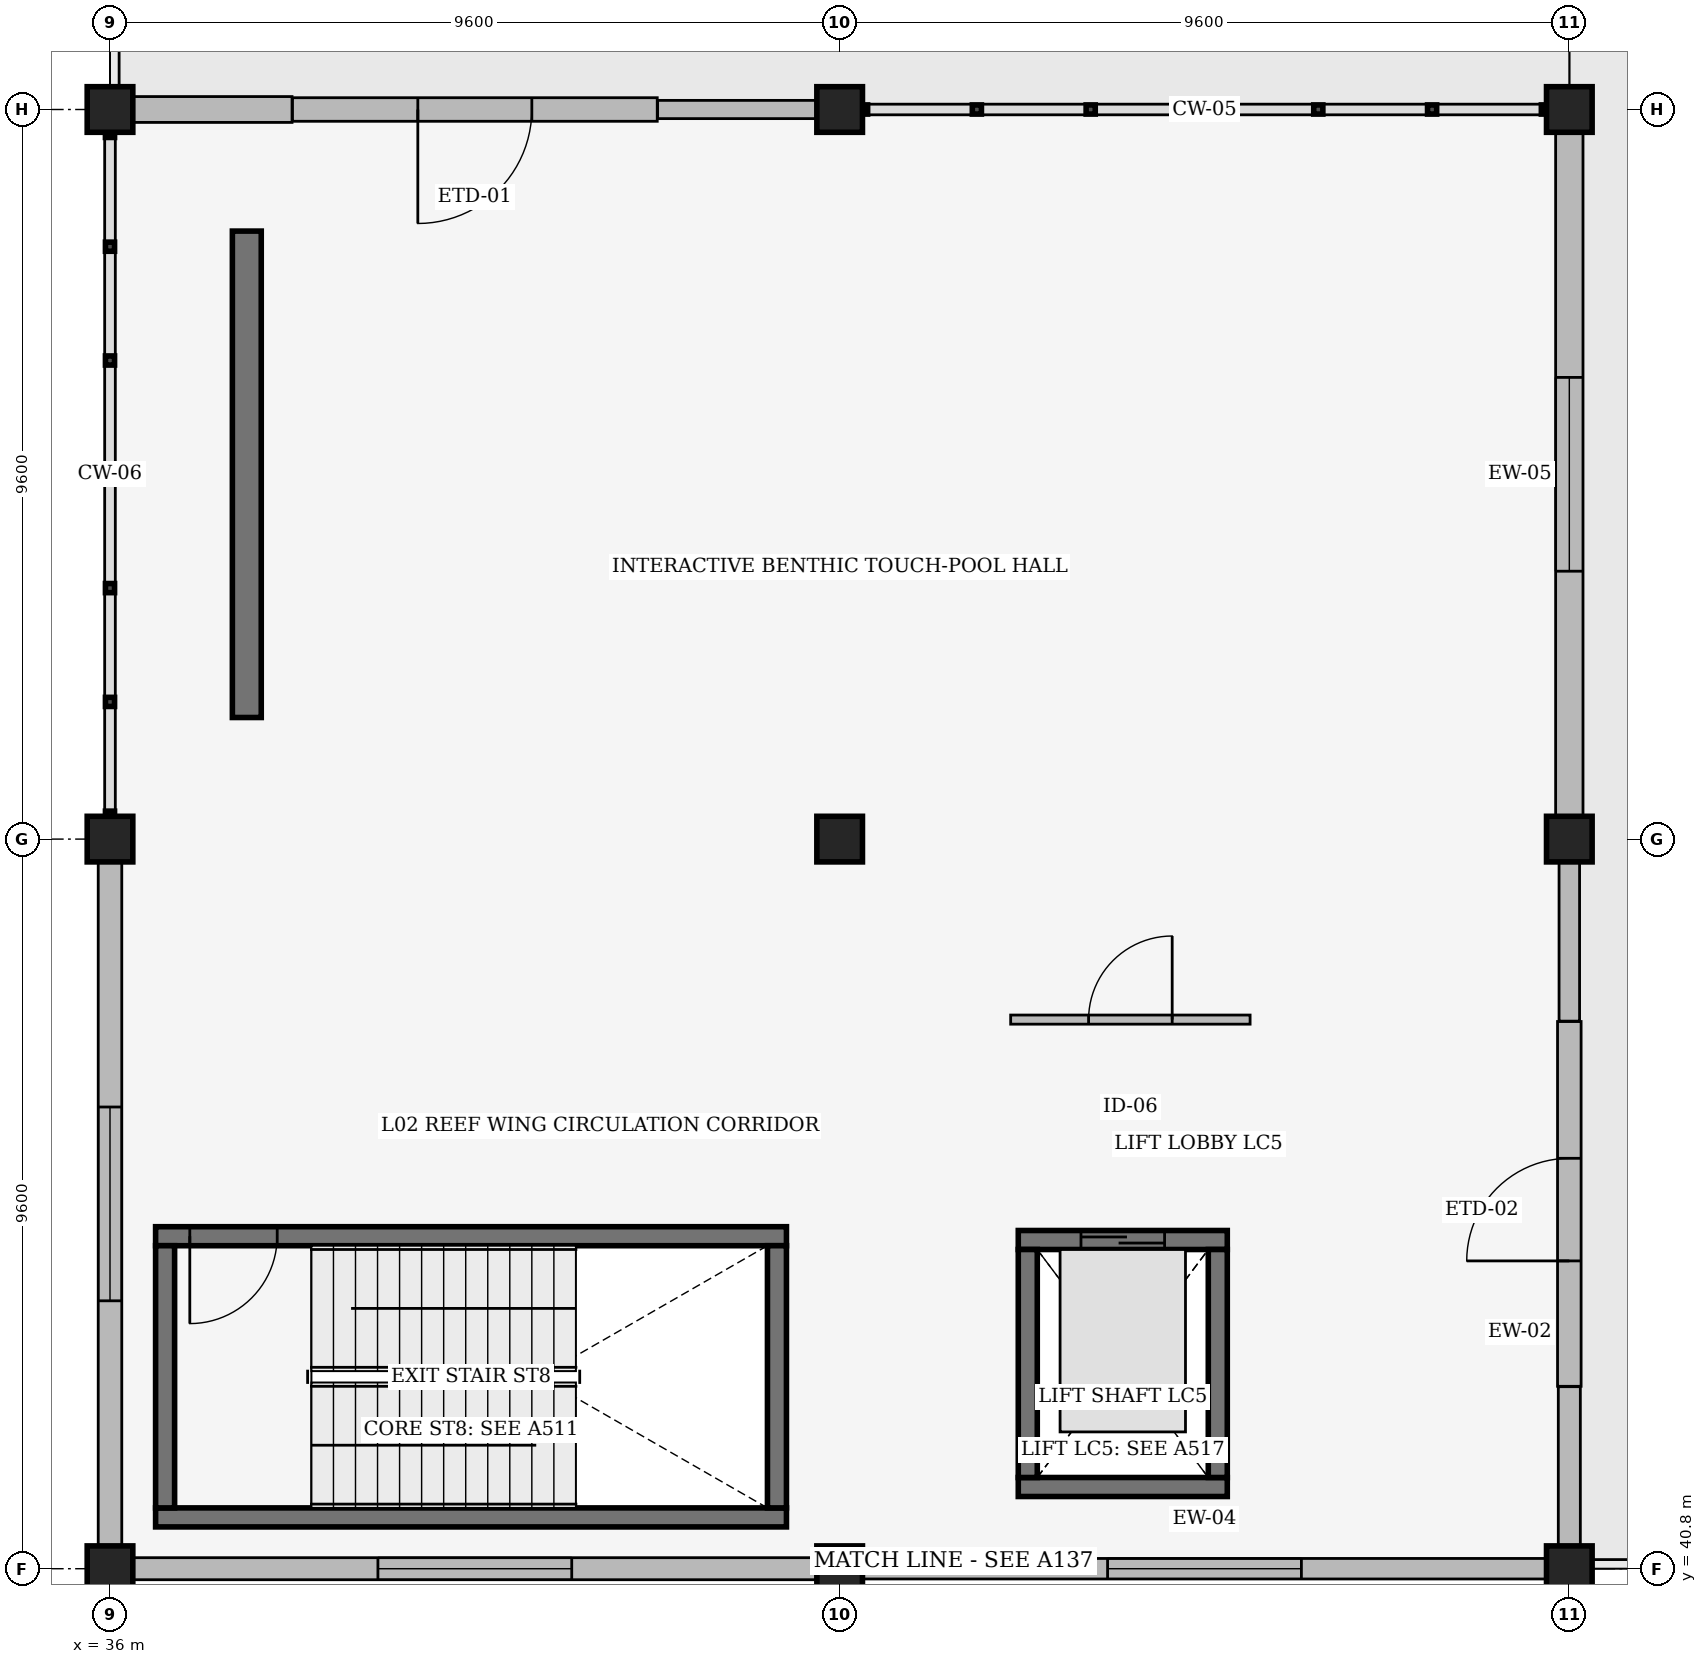
"""IFC4 building model, lengths in metres.
Left out: names, types, materials, properties, quantities, classifications, styles, units other than length and angle.
Written with IfcOpenShell. Run it as: python <this file> out.ifc"""

import sys

from ifc_helpers import new_model, si_unit, direction, frame, frame_2d, origin, origin_2d, place, context, subcontext, project, spatial, rectangle, extrude, element, fill, save


model = new_model("IFC4")
c1 = context("Model", 3, precision=1e-05, world=origin(), true_north=direction((0.0, 1.0)))
c2 = subcontext(c1, "Body", "Model", "MODEL_VIEW")
j1 = project(units=[si_unit("LENGTHUNIT", "METRE"), si_unit("PLANEANGLEUNIT", "RADIAN")], contexts=[c1])
p1 = place(None, origin())
s1 = spatial("IfcSite", under=j1, at=p1, CompositionType="ELEMENT")
p2 = place(p1, origin())
s2 = spatial("IfcBuilding", under=s1, at=p2, CompositionType="ELEMENT")
p3 = place(p2, frame((0.0, 0.0, 10.5)))
s3 = spatial("IfcBuildingStorey", under=s2, at=p3, CompositionType="ELEMENT", Elevation=10.5)
for number, where, z_axis, x_axis in (
    (1, (36.0, 40.8, 0.0), (0.0, 0.0, 1.0), (1.0, 0.0, 0.0)),
    (2, (36.0, 50.4, 0.0), (0.0, 0.0, 1.0), (1.0, 0.0, 0.0)),
    (3, (36.0, 60.0, 0.0), (0.0, 0.0, 1.0), (1.0, 0.0, 0.0)),
    (4, (45.6, 40.8, 0.0), (0.0, 0.0, 1.0), (1.0, 0.0, 0.0)),
    (5, (45.6, 50.4, 0.0), (0.0, 0.0, 1.0), (1.0, 0.0, 0.0)),
    (6, (45.6, 60.0, 0.0), (0.0, 0.0, 1.0), (1.0, 0.0, 0.0)),
    (7, (55.2, 40.8, 0.0), (0.0, 0.0, 1.0), (1.0, 0.0, 0.0)),
    (8, (55.2, 50.4, 0.0), (0.0, 0.0, 1.0), (1.0, 0.0, 0.0)),
    (9, (55.2, 60.0, 0.0), (0.0, 0.0, 1.0), (1.0, 0.0, 0.0)),
):
    element("IfcColumn", number, at=place(p3, frame(where, z_axis=z_axis, x_axis=x_axis)), inside=s3, PredefinedType="COLUMN", context=c2, shape_type="SweptSolid", body=[
        extrude(rectangle(XDim=0.6, YDim=0.6, at=origin_2d()), origin(), (0.0, 0.0, 1.0), 4.8),
    ])
p4 = place(p3, frame((37.8, 52.0, 0.0), z_axis=(0.0, 0.0, 1.0), x_axis=(0.0, 1.0, 0.0)))
e10 = element("IfcWall", 10, at=p4, inside=s3, PredefinedType="SHEAR", context=c2, shape_type="SweptSolid", body=[
    extrude(rectangle(XDim=6.4, YDim=0.38, at=frame_2d((3.2, 0.0))), origin(), (0.0, 0.0, 1.0), 4.8),
])
p5 = place(p3, frame((55.2, 43.2, 0.0), z_axis=(0.0, 0.0, 1.0), x_axis=(0.0, 1.0, 0.0)))
e11 = element("IfcWall", 11, at=p5, inside=s3, PredefinedType="SOLIDWALL", context=c2, shape_type="SweptSolid", body=[
    extrude(rectangle(XDim=4.8, YDim=0.31, at=frame_2d((2.4, 0.0))), origin(), (0.0, 0.0, 1.0), 4.069),
])
p6 = place(p5, frame((3.0, 0.0, 0.0), z_axis=(0.0, 0.0, 1.0), x_axis=(-1.0, 0.0, 0.0)))
e12 = element("IfcOpeningElement", 12, at=p6, cuts=e11, PredefinedType="OPENING", context=c2, shape_type="SweptSolid", body=[
    extrude(rectangle(XDim=1.35, YDim=2.2, at=frame_2d((0.675, 1.1))), frame((0.0, 0.165, 0.0), z_axis=(0.0, -1.0, 0.0), x_axis=(1.0, 0.0, 0.0)), (0.0, 0.0, 1.0), 0.33),
])
p7 = place(p3, frame((43.2, 60.0, 0.0), z_axis=(0.0, 0.0, 1.0), x_axis=(-1.0, 0.0, 0.0)))
e13 = element("IfcWall", 13, at=p7, inside=s3, PredefinedType="SOLIDWALL", context=c2, shape_type="SweptSolid", body=[
    extrude(rectangle(XDim=4.8, YDim=0.31, at=frame_2d((2.4, 0.0))), origin(), (0.0, 0.0, 1.0), 4.138),
])
p8 = place(p7, frame((3.15, 0.0, 0.0), z_axis=(0.0, 0.0, 1.0), x_axis=(-1.0, 0.0, 0.0)))
e14 = element("IfcOpeningElement", 14, at=p8, cuts=e13, PredefinedType="OPENING", context=c2, shape_type="SweptSolid", body=[
    extrude(rectangle(XDim=1.5, YDim=2.25, at=frame_2d((0.75, 1.125))), frame((0.0, 0.165, 0.0), z_axis=(0.0, -1.0, 0.0), x_axis=(1.0, 0.0, 0.0)), (0.0, 0.0, 1.0), 0.33),
])
p9 = place(p3, frame((55.2, 41.108, 0.0), z_axis=(0.0, 0.0, 1.0), x_axis=(0.0, 1.0, 0.0)))
e15 = element("IfcWall", 15, at=p9, inside=s3, PredefinedType="SOLIDWALL", context=c2, shape_type="SweptSolid", body=[
    extrude(rectangle(XDim=2.087, YDim=0.29, at=frame_2d((1.043, 0.0))), origin(), (0.0, 0.0, 1.0), 4.178),
])
p10 = place(p3, frame((55.2, 48.005, 0.0), z_axis=(0.0, 0.0, 1.0), x_axis=(0.0, 1.0, 0.0)))
e16 = element("IfcWall", 16, at=p10, inside=s3, PredefinedType="SOLIDWALL", context=c2, shape_type="SweptSolid", body=[
    extrude(rectangle(XDim=2.087, YDim=0.27, at=frame_2d((1.043, 0.0))), origin(), (0.0, 0.0, 1.0), 4.069),
])
p11 = place(p3, frame((55.2, 50.708, 0.0), z_axis=(0.0, 0.0, 1.0), x_axis=(0.0, 1.0, 0.0)))
e17 = element("IfcWall", 17, at=p11, inside=s3, PredefinedType="SOLIDWALL", context=c2, shape_type="SweptSolid", body=[
    extrude(rectangle(XDim=8.984, YDim=0.36, at=frame_2d((4.492, 0.0))), origin(), (0.0, 0.0, 1.0), 4.029),
])
p12 = place(p11, frame((3.217, 0.0, 0.95)))
e18 = element("IfcOpeningElement", 18, at=p12, cuts=e17, PredefinedType="OPENING", context=c2, shape_type="SweptSolid", body=[
    extrude(rectangle(XDim=2.55, YDim=1.2, at=frame_2d((1.275, 0.6))), frame((0.0, 0.19, 0.0), z_axis=(0.0, -1.0, 0.0), x_axis=(1.0, 0.0, 0.0)), (0.0, 0.0, 1.0), 0.38),
])
p13 = place(p3, frame((45.292, 60.0, 0.0), z_axis=(0.0, 0.0, 1.0), x_axis=(-1.0, 0.0, 0.0)))
e19 = element("IfcWall", 19, at=p13, inside=s3, PredefinedType="SOLIDWALL", context=c2, shape_type="SweptSolid", body=[
    extrude(rectangle(XDim=2.087, YDim=0.24, at=frame_2d((1.043, 0.0))), origin(), (0.0, 0.0, 1.0), 4.138),
])
p14 = place(p3, frame((38.395, 60.0, 0.0), z_axis=(0.0, 0.0, 1.0), x_axis=(-1.0, 0.0, 0.0)))
e20 = element("IfcWall", 20, at=p14, inside=s3, PredefinedType="SOLIDWALL", context=c2, shape_type="SweptSolid", body=[
    extrude(rectangle(XDim=2.087, YDim=0.34, at=frame_2d((1.043, 0.0))), origin(), (0.0, 0.0, 1.0), 4.138),
])
p15 = place(p3, frame((36.0, 50.092, 0.0), z_axis=(0.0, 0.0, 1.0), x_axis=(0.0, -1.0, 0.0)))
e21 = element("IfcWall", 21, at=p15, inside=s3, PredefinedType="SOLIDWALL", context=c2, shape_type="SweptSolid", body=[
    extrude(rectangle(XDim=8.984, YDim=0.31, at=frame_2d((4.492, 0.0))), origin(), (0.0, 0.0, 1.0), 4.133),
])
p16 = place(p15, frame((3.217, 0.0, 0.95)))
e22 = element("IfcOpeningElement", 22, at=p16, cuts=e21, PredefinedType="OPENING", context=c2, shape_type="SweptSolid", body=[
    extrude(rectangle(XDim=2.55, YDim=1.5, at=frame_2d((1.275, 0.75))), frame((0.0, 0.165, 0.0), z_axis=(0.0, -1.0, 0.0), x_axis=(1.0, 0.0, 0.0)), (0.0, 0.0, 1.0), 0.33),
])
p17 = place(p3, frame((36.308, 40.8, 0.0), z_axis=(0.0, 0.0, 1.0), x_axis=(1.0, 0.0, 0.0)))
e23 = element("IfcWall", 23, at=p17, inside=s3, PredefinedType="SOLIDWALL", context=c2, shape_type="SweptSolid", body=[
    extrude(rectangle(XDim=8.984, YDim=0.29, at=frame_2d((4.492, 0.0))), origin(), (0.0, 0.0, 1.0), 3.875),
])
p18 = place(p17, frame((3.217, 0.0, 0.95)))
e24 = element("IfcOpeningElement", 24, at=p18, cuts=e23, PredefinedType="OPENING", context=c2, shape_type="SweptSolid", body=[
    extrude(rectangle(XDim=2.55, YDim=1.8, at=frame_2d((1.275, 0.9))), frame((0.0, 0.155, 0.0), z_axis=(0.0, -1.0, 0.0), x_axis=(1.0, 0.0, 0.0)), (0.0, 0.0, 1.0), 0.31),
])
p19 = place(p3, frame((45.908, 40.8, 0.0), z_axis=(0.0, 0.0, 1.0), x_axis=(1.0, 0.0, 0.0)))
e25 = element("IfcWall", 25, at=p19, inside=s3, PredefinedType="SOLIDWALL", context=c2, shape_type="SweptSolid", body=[
    extrude(rectangle(XDim=8.984, YDim=0.27, at=frame_2d((4.492, 0.0))), origin(), (0.0, 0.0, 1.0), 3.875),
])
p20 = place(p19, frame((3.217, 0.0, 0.95)))
e26 = element("IfcOpeningElement", 26, at=p20, cuts=e25, PredefinedType="OPENING", context=c2, shape_type="SweptSolid", body=[
    extrude(rectangle(XDim=2.55, YDim=2.1, at=frame_2d((1.275, 1.05))), frame((0.0, 0.145, 0.0), z_axis=(0.0, -1.0, 0.0), x_axis=(1.0, 0.0, 0.0)), (0.0, 0.0, 1.0), 0.29),
])
p21 = place(p3, frame((36.6, 41.475, 0.0), z_axis=(0.0, 0.0, 1.0), x_axis=(1.0, 0.0, 0.0)))
e27 = element("IfcWall", 27, at=p21, inside=s3, PredefinedType="SHEAR", context=c2, shape_type="SweptSolid", body=[
    extrude(rectangle(XDim=8.3, YDim=0.25, at=frame_2d((4.15, 0.0))), origin(), (0.0, 0.0, 1.0), 4.52),
])
p22 = place(p3, frame((44.9, 45.175, 0.0), z_axis=(0.0, 0.0, 1.0), x_axis=(-1.0, 0.0, 0.0)))
e28 = element("IfcWall", 28, at=p22, inside=s3, PredefinedType="SHEAR", context=c2, shape_type="SweptSolid", body=[
    extrude(rectangle(XDim=8.3, YDim=0.25, at=frame_2d((4.15, 0.0))), origin(), (0.0, 0.0, 1.0), 4.52),
])
p23 = place(p22, frame((7.85, 0.0, 0.0), z_axis=(0.0, 0.0, 1.0), x_axis=(-1.0, 0.0, 0.0)))
e29 = element("IfcOpeningElement", 29, at=p23, cuts=e28, PredefinedType="OPENING", context=c2, shape_type="SweptSolid", body=[
    extrude(rectangle(XDim=1.15, YDim=2.2, at=frame_2d((0.575, 1.1))), frame((0.0, 0.135, 0.0), z_axis=(0.0, -1.0, 0.0), x_axis=(1.0, 0.0, 0.0)), (0.0, 0.0, 1.0), 0.27),
])
for number, where, z_axis, x_axis in (
    (30, (36.725, 45.05, 0.0), (0.0, 0.0, 1.0), (0.0, -1.0, 0.0)),
    (31, (44.775, 41.6, 0.0), (0.0, 0.0, 1.0), (0.0, 1.0, 0.0)),
):
    element("IfcWall", number, at=place(p3, frame(where, z_axis=z_axis, x_axis=x_axis)), inside=s3, PredefinedType="SHEAR", context=c2, shape_type="SweptSolid", body=[
        extrude(rectangle(XDim=3.45, YDim=0.25, at=frame_2d((1.725, 0.0))), origin(), (0.0, 0.0, 1.0), 4.52),
    ])
p24 = place(p3, frame((47.95, 41.875, 0.0), z_axis=(0.0, 0.0, 1.0), x_axis=(1.0, 0.0, 0.0)))
e32 = element("IfcWall", 32, at=p24, inside=s3, PredefinedType="SHEAR", context=c2, shape_type="SweptSolid", body=[
    extrude(rectangle(XDim=2.75, YDim=0.25, at=frame_2d((1.375, 0.0))), origin(), (0.0, 0.0, 1.0), 4.52),
])
p25 = place(p3, frame((47.95, 45.125, 0.0), z_axis=(0.0, 0.0, 1.0), x_axis=(1.0, 0.0, 0.0)))
e33 = element("IfcWall", 33, at=p25, inside=s3, PredefinedType="SHEAR", context=c2, shape_type="SweptSolid", body=[
    extrude(rectangle(XDim=2.75, YDim=0.25, at=frame_2d((1.375, 0.0))), origin(), (0.0, 0.0, 1.0), 4.52),
])
p26 = place(p25, frame((0.825, 0.0, 0.0)))
e34 = element("IfcOpeningElement", 34, at=p26, cuts=e33, PredefinedType="OPENING", context=c2, shape_type="SweptSolid", body=[
    extrude(rectangle(XDim=1.1, YDim=2.2, at=frame_2d((0.55, 1.1))), frame((0.0, 0.135, 0.0), z_axis=(0.0, -1.0, 0.0), x_axis=(1.0, 0.0, 0.0)), (0.0, 0.0, 1.0), 0.27),
])
for number, where, z_axis, x_axis in (
    (35, (48.075, 42.0, 0.0), (0.0, 0.0, 1.0), (0.0, 1.0, 0.0)),
    (36, (50.575, 42.0, 0.0), (0.0, 0.0, 1.0), (0.0, 1.0, 0.0)),
):
    element("IfcWall", number, at=place(p3, frame(where, z_axis=z_axis, x_axis=x_axis)), inside=s3, PredefinedType="SHEAR", context=c2, shape_type="SweptSolid", body=[
        extrude(rectangle(XDim=3.0, YDim=0.25, at=frame_2d((1.5, 0.0))), origin(), (0.0, 0.0, 1.0), 4.52),
    ])
p27 = place(p3, frame((47.85, 48.025, 0.0), z_axis=(0.0, 0.0, 1.0), x_axis=(1.0, 0.0, 0.0)))
e37 = element("IfcWall", 37, at=p27, inside=s3, PredefinedType="PARTITIONING", context=c2, shape_type="SweptSolid", body=[
    extrude(rectangle(XDim=3.15, YDim=0.12, at=frame_2d((1.575, 0.0))), origin(), (0.0, 0.0, 1.0), 4.069),
])
p28 = place(p27, frame((1.025, 0.0, 0.0)))
e38 = element("IfcOpeningElement", 38, at=p28, cuts=e37, PredefinedType="OPENING", context=c2, shape_type="SweptSolid", body=[
    extrude(rectangle(XDim=1.1, YDim=2.2, at=frame_2d((0.55, 1.1))), frame((0.0, 0.07, 0.0), z_axis=(0.0, -1.0, 0.0), x_axis=(1.0, 0.0, 0.0)), (0.0, 0.0, 1.0), 0.14),
])
p29 = place(p6, origin())
e39 = element("IfcDoor", 39, at=p29, inside=s3, OperationType="SINGLE_SWING_RIGHT", PredefinedType="DOOR", context=c2, shape_type="SweptSolid", body=[
    extrude(rectangle(XDim=1.35, YDim=2.2, at=frame_2d((0.675, 1.1))), frame((0.0, 0.025, 0.0), z_axis=(0.0, -1.0, 0.0), x_axis=(1.0, 0.0, 0.0)), (0.0, 0.0, 1.0), 0.05),
])
fill(e12, e39)
p30 = place(p8, origin())
e40 = element("IfcDoor", 40, at=p30, inside=s3, OperationType="SINGLE_SWING_LEFT", PredefinedType="DOOR", context=c2, shape_type="SweptSolid", body=[
    extrude(rectangle(XDim=1.5, YDim=2.25, at=frame_2d((0.75, 1.125))), frame((0.0, 0.025, 0.0), z_axis=(0.0, -1.0, 0.0), x_axis=(1.0, 0.0, 0.0)), (0.0, 0.0, 1.0), 0.05),
])
fill(e14, e40)
p31 = place(p12, origin())
e41 = element("IfcWindow", 41, at=p31, inside=s3, PartitioningType="SINGLE_PANEL", PredefinedType="WINDOW", context=c2, shape_type="SweptSolid", body=[
    extrude(rectangle(XDim=2.55, YDim=1.2, at=frame_2d((1.275, 0.6))), frame((0.0, 0.03, 0.0), z_axis=(0.0, -1.0, 0.0), x_axis=(1.0, 0.0, 0.0)), (0.0, 0.0, 1.0), 0.06),
])
fill(e18, e41)
p32 = place(p16, origin())
e42 = element("IfcWindow", 42, at=p32, inside=s3, PartitioningType="SINGLE_PANEL", PredefinedType="WINDOW", context=c2, shape_type="SweptSolid", body=[
    extrude(rectangle(XDim=2.55, YDim=1.5, at=frame_2d((1.275, 0.75))), frame((0.0, 0.03, 0.0), z_axis=(0.0, -1.0, 0.0), x_axis=(1.0, 0.0, 0.0)), (0.0, 0.0, 1.0), 0.06),
])
fill(e22, e42)
p33 = place(p18, origin())
e43 = element("IfcWindow", 43, at=p33, inside=s3, PartitioningType="SINGLE_PANEL", PredefinedType="WINDOW", context=c2, shape_type="SweptSolid", body=[
    extrude(rectangle(XDim=2.55, YDim=1.8, at=frame_2d((1.275, 0.9))), frame((0.0, 0.03, 0.0), z_axis=(0.0, -1.0, 0.0), x_axis=(1.0, 0.0, 0.0)), (0.0, 0.0, 1.0), 0.06),
])
fill(e24, e43)
p34 = place(p20, origin())
e44 = element("IfcWindow", 44, at=p34, inside=s3, PartitioningType="SINGLE_PANEL", PredefinedType="WINDOW", context=c2, shape_type="SweptSolid", body=[
    extrude(rectangle(XDim=2.55, YDim=2.1, at=frame_2d((1.275, 1.05))), frame((0.0, 0.03, 0.0), z_axis=(0.0, -1.0, 0.0), x_axis=(1.0, 0.0, 0.0)), (0.0, 0.0, 1.0), 0.06),
])
fill(e26, e44)
p35 = place(p23, origin())
e45 = element("IfcDoor", 45, at=p35, inside=s3, OperationType="SINGLE_SWING_LEFT", PredefinedType="DOOR", context=c2, shape_type="SweptSolid", body=[
    extrude(rectangle(XDim=1.15, YDim=2.2, at=frame_2d((0.575, 1.1))), frame((0.0, 0.025, 0.0), z_axis=(0.0, -1.0, 0.0), x_axis=(1.0, 0.0, 0.0)), (0.0, 0.0, 1.0), 0.05),
])
fill(e29, e45)
p36 = place(p26, origin())
e46 = element("IfcDoor", 46, at=p36, inside=s3, OperationType="DOUBLE_DOOR_SLIDING", PredefinedType="DOOR", context=c2, shape_type="SweptSolid", body=[
    extrude(rectangle(XDim=1.1, YDim=2.2, at=frame_2d((0.55, 1.1))), frame((0.0, 0.025, 0.0), z_axis=(0.0, -1.0, 0.0), x_axis=(1.0, 0.0, 0.0)), (0.0, 0.0, 1.0), 0.05),
])
fill(e34, e46)
p37 = place(p28, origin())
e47 = element("IfcDoor", 47, at=p37, inside=s3, OperationType="SINGLE_SWING_RIGHT", PredefinedType="DOOR", context=c2, shape_type="SweptSolid", body=[
    extrude(rectangle(XDim=1.1, YDim=2.2, at=frame_2d((0.55, 1.1))), frame((0.0, 0.025, 0.0), z_axis=(0.0, -1.0, 0.0), x_axis=(1.0, 0.0, 0.0)), (0.0, 0.0, 1.0), 0.05),
])
fill(e38, e47)
save(model, sys.argv[1])
